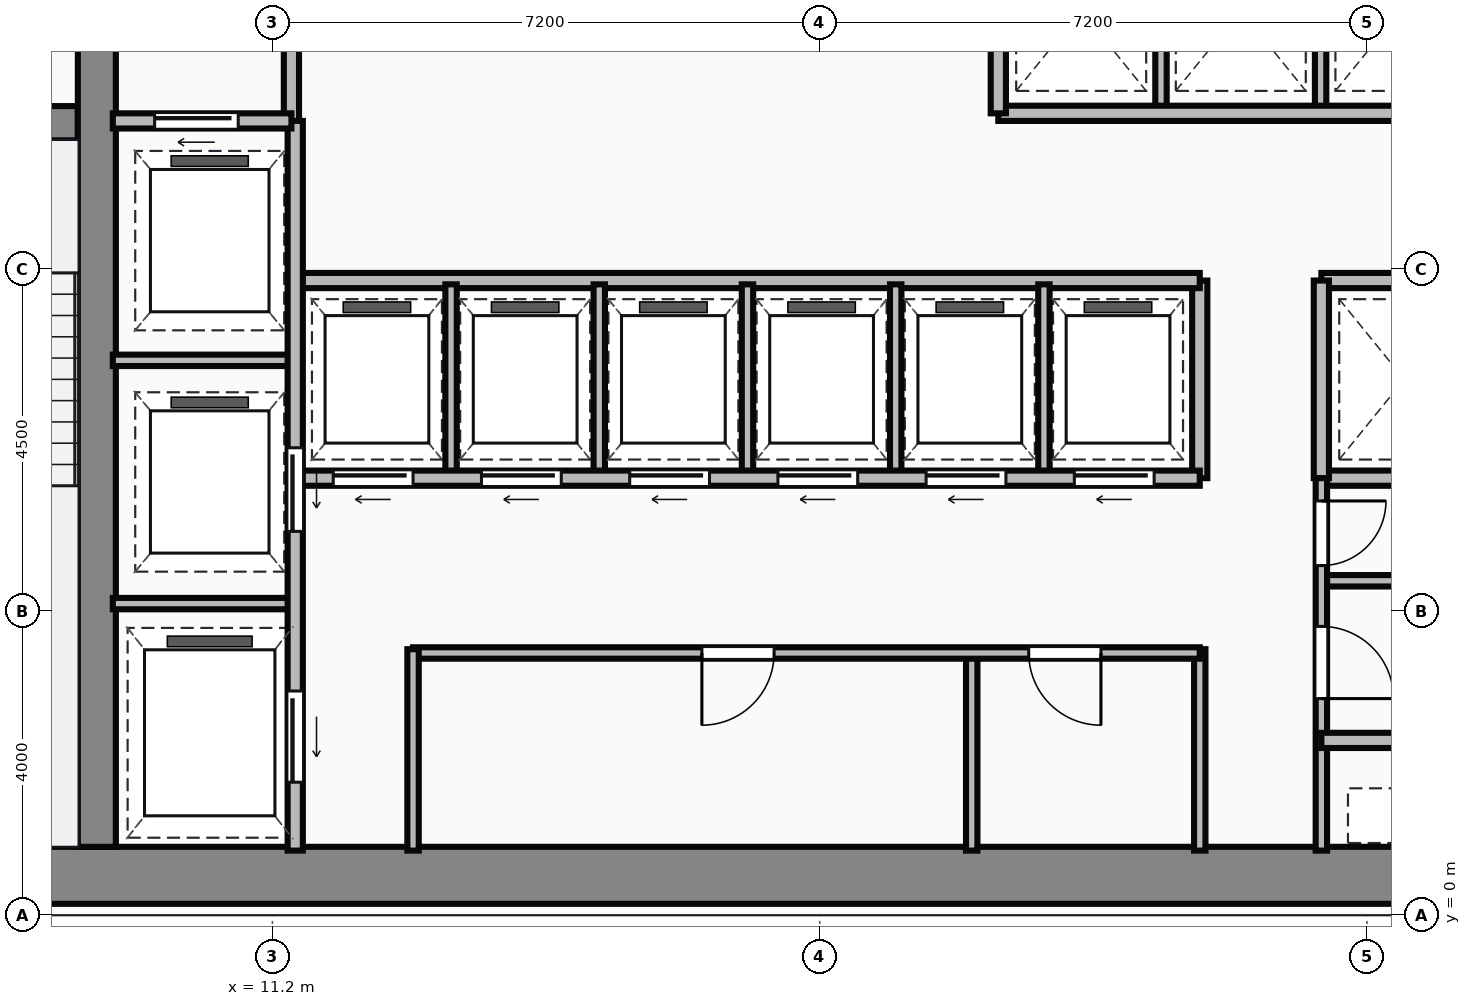
"""IFC4 building model, lengths in metres.
Left out: names, types, materials, properties, quantities, classifications, styles, units other than length and angle.
Written with IfcOpenShell. Run it as: python <this file> out.ifc"""

import sys

from ifc_helpers import new_model, si_unit, direction, frame, frame_2d, origin, place, context, subcontext, project, spatial, rectangle, extrude, source, transform, mapped, element, fill, save


model = new_model("IFC4")
c1 = context("Model", 3, precision=1e-05, world=origin(), true_north=direction((0.0, 1.0)))
c2 = subcontext(c1, "Body", "Model", "MODEL_VIEW")
j1 = project(units=[si_unit("LENGTHUNIT", "METRE"), si_unit("PLANEANGLEUNIT", "RADIAN")], contexts=[c1])
p1 = place(None, origin())
s1 = spatial("IfcSite", under=j1, at=p1, CompositionType="ELEMENT")
p2 = place(p1, origin())
s2 = spatial("IfcBuilding", under=s1, at=p2, CompositionType="ELEMENT")
p3 = place(p2, frame((0.0, 0.0, 155.2)))
s3 = spatial("IfcBuildingStorey", under=s2, at=p3, CompositionType="ELEMENT", Elevation=155.2)
m1 = source(origin(), c2, "Body", "SweptSolid", [
    extrude(rectangle(XDim=29.5, YDim=0.75, at=frame_2d((14.75, 0.0))), origin(), (0.0, 0.0, 1.0), 3.65),
])
p4 = place(p3, frame((4.5, 0.525, 0.0), z_axis=(0.0, 0.0, 1.0), x_axis=(1.0, 0.0, 0.0)))
e1 = element("IfcWall", 1, at=p4, inside=s3, PredefinedType="SHEAR", context=c2, shape_type="MappedRepresentation", body=[
    mapped(m1, transform((0.0, 0.0, 0.0))),
])
m2 = source(origin(), c2, "Body", "SweptSolid", [
    extrude(rectangle(XDim=12.35, YDim=0.5, at=frame_2d((6.175, 0.0))), origin(), (0.0, 0.0, 1.0), 3.65),
])
p5 = place(p3, frame((8.89, 0.9, 0.0), z_axis=(0.0, 0.0, 1.0), x_axis=(0.0, 1.0, 0.0)))
e2 = element("IfcWall", 2, at=p5, inside=s3, PredefinedType="SHEAR", context=c2, shape_type="MappedRepresentation", body=[
    mapped(m2, transform((0.0, 0.0, 0.0))),
])
m3 = source(origin(), c2, "Body", "SweptSolid", [
    extrude(rectangle(XDim=3.39, YDim=0.45, at=frame_2d((1.695, 0.0))), origin(), (0.0, 0.0, 1.0), 3.65),
])
p6 = place(p3, frame((5.25, 10.42, 0.0), z_axis=(0.0, 0.0, 1.0), x_axis=(1.0, 0.0, 0.0)))
e3 = element("IfcWall", 3, at=p6, inside=s3, PredefinedType="SHEAR", context=c2, shape_type="MappedRepresentation", body=[
    mapped(m3, transform((0.0, 0.0, 0.0))),
])
p7 = place(p6, frame((1.05, 0.0, 0.0)))
e4 = element("IfcOpeningElement", 4, at=p7, cuts=e3, PredefinedType="OPENING", context=c2, shape_type="SweptSolid", body=[
    extrude(rectangle(XDim=1.1, YDim=2.15, at=frame_2d((0.55, 1.075))), frame((0.0, 0.235, 0.0), z_axis=(0.0, -1.0, 0.0), x_axis=(1.0, 0.0, 0.0)), (0.0, 0.0, 1.0), 0.47),
])
m4 = source(origin(), c2, "Body", "SweptSolid", [
    extrude(rectangle(XDim=3.18, YDim=0.2, at=frame_2d((1.59, 0.0))), origin(), (0.0, 0.0, 1.0), 3.4),
])
p8 = place(p3, frame((11.45, 10.42, 0.0), z_axis=(0.0, 0.0, 1.0), x_axis=(0.0, 1.0, 0.0)))
e5 = element("IfcWall", 5, at=p8, inside=s3, PredefinedType="PARTITIONING", context=c2, shape_type="MappedRepresentation", body=[
    mapped(m4, transform((0.0, 0.0, 0.0))),
])
m5 = source(origin(), c2, "Body", "SweptSolid", [
    extrude(rectangle(XDim=2.35, YDim=0.2, at=frame_2d((1.175, 0.0))), origin(), (0.0, 0.0, 1.0), 3.4),
])
p9 = place(p3, frame((9.1, 10.45, 0.0), z_axis=(0.0, 0.0, 1.0), x_axis=(1.0, 0.0, 0.0)))
e6 = element("IfcWall", 6, at=p9, inside=s3, PredefinedType="PARTITIONING", context=c2, shape_type="MappedRepresentation", body=[
    mapped(m5, transform((0.0, 0.0, 0.0))),
])
p10 = place(p9, frame((0.55, 0.0, 0.0)))
e7 = element("IfcOpeningElement", 7, at=p10, cuts=e6, PredefinedType="OPENING", context=c2, shape_type="SweptSolid", body=[
    extrude(rectangle(XDim=1.1, YDim=2.15, at=frame_2d((0.55, 1.075))), frame((0.0, 0.11, 0.0), z_axis=(0.0, -1.0, 0.0), x_axis=(1.0, 0.0, 0.0)), (0.0, 0.0, 1.0), 0.22),
])
m6 = source(origin(), c2, "Body", "SweptSolid", [
    extrude(rectangle(XDim=9.6, YDim=0.2, at=frame_2d((4.8, 0.0))), origin(), (0.0, 0.0, 1.0), 3.4),
])
p11 = place(p3, frame((11.5, 0.85, 0.0), z_axis=(0.0, 0.0, 1.0), x_axis=(0.0, 1.0, 0.0)))
e8 = element("IfcWall", 8, at=p11, inside=s3, PredefinedType="PARTITIONING", context=c2, shape_type="MappedRepresentation", body=[
    mapped(m6, transform((0.0, 0.0, 0.0))),
])
p12 = place(p11, frame((4.2, 0.0, 0.0)))
e9 = element("IfcOpeningElement", 9, at=p12, cuts=e8, PredefinedType="OPENING", context=c2, shape_type="SweptSolid", body=[
    extrude(rectangle(XDim=1.1, YDim=2.15, at=frame_2d((0.55, 1.075))), frame((0.0, 0.11, 0.0), z_axis=(0.0, -1.0, 0.0), x_axis=(1.0, 0.0, 0.0)), (0.0, 0.0, 1.0), 0.22),
])
p13 = place(p11, frame((0.9, 0.0, 0.0)))
e10 = element("IfcOpeningElement", 10, at=p13, cuts=e8, PredefinedType="OPENING", context=c2, shape_type="SweptSolid", body=[
    extrude(rectangle(XDim=1.2, YDim=2.15, at=frame_2d((0.6, 1.075))), frame((0.0, 0.11, 0.0), z_axis=(0.0, -1.0, 0.0), x_axis=(1.0, 0.0, 0.0)), (0.0, 0.0, 1.0), 0.22),
])
m7 = source(origin(), c2, "Body", "SweptSolid", [
    extrude(rectangle(XDim=2.4, YDim=0.15, at=frame_2d((1.2, 0.0))), origin(), (0.0, 0.0, 1.0), 3.4),
])
for number, where, z_axis, x_axis in (
    (11, (9.1, 4.1, 0.0), (0.0, 0.0, 1.0), (1.0, 0.0, 0.0)),
    (12, (9.1, 7.3, 0.0), (0.0, 0.0, 1.0), (1.0, 0.0, 0.0)),
):
    element("IfcWall", number, at=place(p3, frame(where, z_axis=z_axis, x_axis=x_axis)), inside=s3, PredefinedType="PARTITIONING", context=c2, shape_type="MappedRepresentation", body=[
        mapped(m7, transform((0.0, 0.0, 0.0))),
    ])
m8 = source(origin(), c2, "Body", "SweptSolid", [
    extrude(rectangle(XDim=2.65, YDim=0.15, at=frame_2d((1.325, 0.0))), origin(), (0.0, 0.0, 1.0), 3.4),
])
p14 = place(p3, frame((13.05, 0.85, 0.0), z_axis=(0.0, 0.0, 1.0), x_axis=(0.0, 1.0, 0.0)))
e13 = element("IfcWall", 13, at=p14, inside=s3, PredefinedType="PARTITIONING", context=c2, shape_type="MappedRepresentation", body=[
    mapped(m8, transform((0.0, 0.0, 0.0))),
])
m9 = source(origin(), c2, "Body", "SweptSolid", [
    extrude(rectangle(XDim=10.35, YDim=0.15, at=frame_2d((5.175, 0.0))), origin(), (0.0, 0.0, 1.0), 3.4),
])
p15 = place(p3, frame((13.05, 3.45, 0.0), z_axis=(0.0, 0.0, 1.0), x_axis=(1.0, 0.0, 0.0)))
e14 = element("IfcWall", 14, at=p15, inside=s3, PredefinedType="PARTITIONING", context=c2, shape_type="MappedRepresentation", body=[
    mapped(m9, transform((0.0, 0.0, 0.0))),
])
p16 = place(p15, frame((3.8, 0.0, 0.0)))
e15 = element("IfcOpeningElement", 15, at=p16, cuts=e14, PredefinedType="OPENING", context=c2, shape_type="SweptSolid", body=[
    extrude(rectangle(XDim=0.95, YDim=2.15, at=frame_2d((0.475, 1.075))), frame((0.0, 0.085, 0.0), z_axis=(0.0, -1.0, 0.0), x_axis=(1.0, 0.0, 0.0)), (0.0, 0.0, 1.0), 0.17),
])
p17 = place(p15, frame((8.1, 0.0, 0.0)))
e16 = element("IfcOpeningElement", 16, at=p17, cuts=e14, PredefinedType="OPENING", context=c2, shape_type="SweptSolid", body=[
    extrude(rectangle(XDim=0.95, YDim=2.15, at=frame_2d((0.475, 1.075))), frame((0.0, 0.085, 0.0), z_axis=(0.0, -1.0, 0.0), x_axis=(1.0, 0.0, 0.0)), (0.0, 0.0, 1.0), 0.17),
])
p18 = place(p3, frame((23.4, 0.85, 0.0), z_axis=(0.0, 0.0, 1.0), x_axis=(0.0, 1.0, 0.0)))
e17 = element("IfcWall", 17, at=p18, inside=s3, PredefinedType="PARTITIONING", context=c2, shape_type="MappedRepresentation", body=[
    mapped(m8, transform((0.0, 0.0, 0.0))),
])
m10 = source(origin(), c2, "Body", "SweptSolid", [
    extrude(rectangle(XDim=2.6, YDim=0.15, at=frame_2d((1.3, 0.0))), origin(), (0.0, 0.0, 1.0), 3.4),
])
p19 = place(p3, frame((20.4, 0.85, 0.0), z_axis=(0.0, 0.0, 1.0), x_axis=(0.0, 1.0, 0.0)))
e18 = element("IfcWall", 18, at=p19, inside=s3, PredefinedType="PARTITIONING", context=c2, shape_type="MappedRepresentation", body=[
    mapped(m10, transform((0.0, 0.0, 0.0))),
])
m11 = source(origin(), c2, "Body", "SweptSolid", [
    extrude(rectangle(XDim=11.85, YDim=0.2, at=frame_2d((5.925, 0.0))), origin(), (0.0, 0.0, 1.0), 3.4),
])
p20 = place(p3, frame((11.55, 5.75, 0.0), z_axis=(0.0, 0.0, 1.0), x_axis=(1.0, 0.0, 0.0)))
e19 = element("IfcWall", 19, at=p20, inside=s3, PredefinedType="PARTITIONING", context=c2, shape_type="MappedRepresentation", body=[
    mapped(m11, transform((0.0, 0.0, 0.0))),
])
p21 = place(p20, frame((0.45, 0.0, 0.0)))
e20 = element("IfcOpeningElement", 20, at=p21, cuts=e19, PredefinedType="OPENING", context=c2, shape_type="SweptSolid", body=[
    extrude(rectangle(XDim=1.05, YDim=2.15, at=frame_2d((0.525, 1.075))), frame((0.0, 0.11, 0.0), z_axis=(0.0, -1.0, 0.0), x_axis=(1.0, 0.0, 0.0)), (0.0, 0.0, 1.0), 0.22),
])
p22 = place(p20, frame((2.4, 0.0, 0.0)))
e21 = element("IfcOpeningElement", 21, at=p22, cuts=e19, PredefinedType="OPENING", context=c2, shape_type="SweptSolid", body=[
    extrude(rectangle(XDim=1.05, YDim=2.15, at=frame_2d((0.525, 1.075))), frame((0.0, 0.11, 0.0), z_axis=(0.0, -1.0, 0.0), x_axis=(1.0, 0.0, 0.0)), (0.0, 0.0, 1.0), 0.22),
])
p23 = place(p20, frame((4.35, 0.0, 0.0)))
e22 = element("IfcOpeningElement", 22, at=p23, cuts=e19, PredefinedType="OPENING", context=c2, shape_type="SweptSolid", body=[
    extrude(rectangle(XDim=1.05, YDim=2.15, at=frame_2d((0.525, 1.075))), frame((0.0, 0.11, 0.0), z_axis=(0.0, -1.0, 0.0), x_axis=(1.0, 0.0, 0.0)), (0.0, 0.0, 1.0), 0.22),
])
p24 = place(p20, frame((6.3, 0.0, 0.0)))
e23 = element("IfcOpeningElement", 23, at=p24, cuts=e19, PredefinedType="OPENING", context=c2, shape_type="SweptSolid", body=[
    extrude(rectangle(XDim=1.05, YDim=2.15, at=frame_2d((0.525, 1.075))), frame((0.0, 0.11, 0.0), z_axis=(0.0, -1.0, 0.0), x_axis=(1.0, 0.0, 0.0)), (0.0, 0.0, 1.0), 0.22),
])
p25 = place(p20, frame((8.25, 0.0, 0.0)))
e24 = element("IfcOpeningElement", 24, at=p25, cuts=e19, PredefinedType="OPENING", context=c2, shape_type="SweptSolid", body=[
    extrude(rectangle(XDim=1.05, YDim=2.15, at=frame_2d((0.525, 1.075))), frame((0.0, 0.11, 0.0), z_axis=(0.0, -1.0, 0.0), x_axis=(1.0, 0.0, 0.0)), (0.0, 0.0, 1.0), 0.22),
])
p26 = place(p20, frame((10.2, 0.0, 0.0)))
e25 = element("IfcOpeningElement", 25, at=p26, cuts=e19, PredefinedType="OPENING", context=c2, shape_type="SweptSolid", body=[
    extrude(rectangle(XDim=1.05, YDim=2.15, at=frame_2d((0.525, 1.075))), frame((0.0, 0.11, 0.0), z_axis=(0.0, -1.0, 0.0), x_axis=(1.0, 0.0, 0.0)), (0.0, 0.0, 1.0), 0.22),
])
p27 = place(p3, frame((11.55, 8.35, 0.0), z_axis=(0.0, 0.0, 1.0), x_axis=(1.0, 0.0, 0.0)))
e26 = element("IfcWall", 26, at=p27, inside=s3, PredefinedType="PARTITIONING", context=c2, shape_type="MappedRepresentation", body=[
    mapped(m11, transform((0.0, 0.0, 0.0))),
])
m12 = source(origin(), c2, "Body", "SweptSolid", [
    extrude(rectangle(XDim=2.6, YDim=0.2, at=frame_2d((1.3, 0.0))), origin(), (0.0, 0.0, 1.0), 3.4),
])
p28 = place(p3, frame((23.4, 5.75, 0.0), z_axis=(0.0, 0.0, 1.0), x_axis=(0.0, 1.0, 0.0)))
e27 = element("IfcWall", 27, at=p28, inside=s3, PredefinedType="PARTITIONING", context=c2, shape_type="MappedRepresentation", body=[
    mapped(m12, transform((0.0, 0.0, 0.0))),
])
m13 = source(origin(), c2, "Body", "SweptSolid", [
    extrude(rectangle(XDim=2.5, YDim=0.15, at=frame_2d((1.25, 0.0))), origin(), (0.0, 0.0, 1.0), 3.4),
])
for number, where, z_axis, x_axis in (
    (28, (13.55, 5.8, 0.0), (0.0, 0.0, 1.0), (0.0, 1.0, 0.0)),
    (29, (15.5, 5.8, 0.0), (0.0, 0.0, 1.0), (0.0, 1.0, 0.0)),
    (30, (17.45, 5.8, 0.0), (0.0, 0.0, 1.0), (0.0, 1.0, 0.0)),
    (31, (19.4, 5.8, 0.0), (0.0, 0.0, 1.0), (0.0, 1.0, 0.0)),
    (32, (21.35, 5.8, 0.0), (0.0, 0.0, 1.0), (0.0, 1.0, 0.0)),
):
    element("IfcWall", number, at=place(p3, frame(where, z_axis=z_axis, x_axis=x_axis)), inside=s3, PredefinedType="PARTITIONING", context=c2, shape_type="MappedRepresentation", body=[
        mapped(m13, transform((0.0, 0.0, 0.0))),
    ])
m14 = source(origin(), c2, "Body", "SweptSolid", [
    extrude(rectangle(XDim=8.8, YDim=0.2, at=frame_2d((4.4, 0.0))), origin(), (0.0, 0.0, 1.0), 3.4),
])
p29 = place(p3, frame((20.75, 10.55, 0.0), z_axis=(0.0, 0.0, 1.0), x_axis=(1.0, 0.0, 0.0)))
e33 = element("IfcWall", 33, at=p29, inside=s3, PredefinedType="PARTITIONING", context=c2, shape_type="MappedRepresentation", body=[
    mapped(m14, transform((0.0, 0.0, 0.0))),
])
m15 = source(origin(), c2, "Body", "SweptSolid", [
    extrude(rectangle(XDim=3.0, YDim=0.2, at=frame_2d((1.5, 0.0))), origin(), (0.0, 0.0, 1.0), 3.4),
])
p30 = place(p3, frame((20.75, 10.55, 0.0), z_axis=(0.0, 0.0, 1.0), x_axis=(0.0, 1.0, 0.0)))
e34 = element("IfcWall", 34, at=p30, inside=s3, PredefinedType="PARTITIONING", context=c2, shape_type="MappedRepresentation", body=[
    mapped(m15, transform((0.0, 0.0, 0.0))),
])
m16 = source(origin(), c2, "Body", "SweptSolid", [
    extrude(rectangle(XDim=2.85, YDim=0.15, at=frame_2d((1.425, 0.0))), origin(), (0.0, 0.0, 1.0), 3.4),
])
for number, where, z_axis, x_axis in (
    (35, (22.89, 10.6, 0.0), (0.0, 0.0, 1.0), (0.0, 1.0, 0.0)),
    (36, (24.99, 10.6, 0.0), (0.0, 0.0, 1.0), (0.0, 1.0, 0.0)),
):
    element("IfcWall", number, at=place(p3, frame(where, z_axis=z_axis, x_axis=x_axis)), inside=s3, PredefinedType="PARTITIONING", context=c2, shape_type="MappedRepresentation", body=[
        mapped(m16, transform((0.0, 0.0, 0.0))),
    ])
m17 = source(origin(), c2, "Body", "SweptSolid", [
    extrude(rectangle(XDim=4.55, YDim=0.2, at=frame_2d((2.275, 0.0))), origin(), (0.0, 0.0, 1.0), 3.4),
])
for number, where, z_axis, x_axis in (
    (37, (25.0, 8.35, 0.0), (0.0, 0.0, 1.0), (1.0, 0.0, 0.0)),
    (38, (25.0, 5.75, 0.0), (0.0, 0.0, 1.0), (1.0, 0.0, 0.0)),
):
    element("IfcWall", number, at=place(p3, frame(where, z_axis=z_axis, x_axis=x_axis)), inside=s3, PredefinedType="PARTITIONING", context=c2, shape_type="MappedRepresentation", body=[
        mapped(m17, transform((0.0, 0.0, 0.0))),
    ])
p31 = place(p3, frame((25.0, 5.75, 0.0), z_axis=(0.0, 0.0, 1.0), x_axis=(0.0, 1.0, 0.0)))
e39 = element("IfcWall", 39, at=p31, inside=s3, PredefinedType="PARTITIONING", context=c2, shape_type="MappedRepresentation", body=[
    mapped(m12, transform((0.0, 0.0, 0.0))),
])
m18 = source(origin(), c2, "Body", "SweptSolid", [
    extrude(rectangle(XDim=4.9, YDim=0.15, at=frame_2d((2.45, 0.0))), origin(), (0.0, 0.0, 1.0), 3.4),
])
p32 = place(p3, frame((25.0, 0.85, 0.0), z_axis=(0.0, 0.0, 1.0), x_axis=(0.0, 1.0, 0.0)))
e40 = element("IfcWall", 40, at=p32, inside=s3, PredefinedType="PARTITIONING", context=c2, shape_type="MappedRepresentation", body=[
    mapped(m18, transform((0.0, 0.0, 0.0))),
])
p33 = place(p32, frame((2.0, 0.0, 0.0)))
e41 = element("IfcOpeningElement", 41, at=p33, cuts=e40, PredefinedType="OPENING", context=c2, shape_type="SweptSolid", body=[
    extrude(rectangle(XDim=0.95, YDim=2.15, at=frame_2d((0.475, 1.075))), frame((0.0, 0.085, 0.0), z_axis=(0.0, -1.0, 0.0), x_axis=(1.0, 0.0, 0.0)), (0.0, 0.0, 1.0), 0.17),
])
p34 = place(p32, frame((3.75, 0.0, 0.0)))
e42 = element("IfcOpeningElement", 42, at=p34, cuts=e40, PredefinedType="OPENING", context=c2, shape_type="SweptSolid", body=[
    extrude(rectangle(XDim=0.85, YDim=2.15, at=frame_2d((0.425, 1.075))), frame((0.0, 0.085, 0.0), z_axis=(0.0, -1.0, 0.0), x_axis=(1.0, 0.0, 0.0)), (0.0, 0.0, 1.0), 0.17),
])
m19 = source(origin(), c2, "Body", "SweptSolid", [
    extrude(rectangle(XDim=2.4, YDim=0.2, at=frame_2d((1.2, 0.0))), origin(), (0.0, 0.0, 1.0), 3.4),
])
p35 = place(p3, frame((25.0, 2.3, 0.0), z_axis=(0.0, 0.0, 1.0), x_axis=(1.0, 0.0, 0.0)))
e43 = element("IfcWall", 43, at=p35, inside=s3, PredefinedType="PARTITIONING", context=c2, shape_type="MappedRepresentation", body=[
    mapped(m19, transform((0.0, 0.0, 0.0))),
])
m20 = source(origin(), c2, "Body", "SweptSolid", [
    extrude(rectangle(XDim=4.55, YDim=0.15, at=frame_2d((2.275, 0.0))), origin(), (0.0, 0.0, 1.0), 3.4),
])
p36 = place(p3, frame((25.0, 4.4, 0.0), z_axis=(0.0, 0.0, 1.0), x_axis=(1.0, 0.0, 0.0)))
e44 = element("IfcWall", 44, at=p36, inside=s3, PredefinedType="PARTITIONING", context=c2, shape_type="MappedRepresentation", body=[
    mapped(m20, transform((0.0, 0.0, 0.0))),
])
m21 = source(origin(), c2, "Body", "SweptSolid", [
    extrude(rectangle(XDim=1.1, YDim=2.15, at=frame_2d((0.55, 1.075))), frame((0.0, 0.025, 0.0), z_axis=(0.0, -1.0, 0.0), x_axis=(1.0, 0.0, 0.0)), (0.0, 0.0, 1.0), 0.05),
])
p37 = place(p10, origin())
e45 = element("IfcDoor", 45, at=p37, inside=s3, OperationType="SLIDING_TO_LEFT", PredefinedType="DOOR", context=c2, shape_type="MappedRepresentation", body=[
    mapped(m21, transform((0.0, 0.0, 0.0))),
])
fill(e7, e45)
p38 = place(p12, frame((1.1, 0.0, 0.0), z_axis=(0.0, 0.0, 1.0), x_axis=(-1.0, 0.0, 0.0)))
e46 = element("IfcDoor", 46, at=p38, inside=s3, OperationType="SLIDING_TO_LEFT", PredefinedType="DOOR", context=c2, shape_type="MappedRepresentation", body=[
    mapped(m21, transform((0.0, 0.0, 0.0))),
])
fill(e9, e46)
m22 = source(origin(), c2, "Body", "SweptSolid", [
    extrude(rectangle(XDim=1.2, YDim=2.15, at=frame_2d((0.6, 1.075))), frame((0.0, 0.025, 0.0), z_axis=(0.0, -1.0, 0.0), x_axis=(1.0, 0.0, 0.0)), (0.0, 0.0, 1.0), 0.05),
])
p39 = place(p13, frame((1.2, 0.0, 0.0), z_axis=(0.0, 0.0, 1.0), x_axis=(-1.0, 0.0, 0.0)))
e47 = element("IfcDoor", 47, at=p39, inside=s3, OperationType="SLIDING_TO_LEFT", PredefinedType="DOOR", context=c2, shape_type="MappedRepresentation", body=[
    mapped(m22, transform((0.0, 0.0, 0.0))),
])
fill(e10, e47)
m23 = source(origin(), c2, "Body", "SweptSolid", [
    extrude(rectangle(XDim=0.95, YDim=2.15, at=frame_2d((0.475, 1.075))), frame((0.0, 0.025, 0.0), z_axis=(0.0, -1.0, 0.0), x_axis=(1.0, 0.0, 0.0)), (0.0, 0.0, 1.0), 0.05),
])
p40 = place(p16, origin())
e48 = element("IfcDoor", 48, at=p40, inside=s3, OperationType="SINGLE_SWING_LEFT", PredefinedType="DOOR", context=c2, shape_type="MappedRepresentation", body=[
    mapped(m23, transform((0.0, 0.0, 0.0))),
])
fill(e15, e48)
p41 = place(p17, origin())
e49 = element("IfcDoor", 49, at=p41, inside=s3, OperationType="SINGLE_SWING_RIGHT", PredefinedType="DOOR", context=c2, shape_type="MappedRepresentation", body=[
    mapped(m23, transform((0.0, 0.0, 0.0))),
])
fill(e16, e49)
m24 = source(origin(), c2, "Body", "SweptSolid", [
    extrude(rectangle(XDim=1.05, YDim=2.15, at=frame_2d((0.525, 1.075))), frame((0.0, 0.025, 0.0), z_axis=(0.0, -1.0, 0.0), x_axis=(1.0, 0.0, 0.0)), (0.0, 0.0, 1.0), 0.05),
])
p42 = place(p21, frame((1.05, 0.0, 0.0), z_axis=(0.0, 0.0, 1.0), x_axis=(-1.0, 0.0, 0.0)))
e50 = element("IfcDoor", 50, at=p42, inside=s3, OperationType="SLIDING_TO_LEFT", PredefinedType="DOOR", context=c2, shape_type="MappedRepresentation", body=[
    mapped(m24, transform((0.0, 0.0, 0.0))),
])
fill(e20, e50)
p43 = place(p22, frame((1.05, 0.0, 0.0), z_axis=(0.0, 0.0, 1.0), x_axis=(-1.0, 0.0, 0.0)))
e51 = element("IfcDoor", 51, at=p43, inside=s3, OperationType="SLIDING_TO_LEFT", PredefinedType="DOOR", context=c2, shape_type="MappedRepresentation", body=[
    mapped(m24, transform((0.0, 0.0, 0.0))),
])
fill(e21, e51)
p44 = place(p23, frame((1.05, 0.0, 0.0), z_axis=(0.0, 0.0, 1.0), x_axis=(-1.0, 0.0, 0.0)))
e52 = element("IfcDoor", 52, at=p44, inside=s3, OperationType="SLIDING_TO_LEFT", PredefinedType="DOOR", context=c2, shape_type="MappedRepresentation", body=[
    mapped(m24, transform((0.0, 0.0, 0.0))),
])
fill(e22, e52)
p45 = place(p24, frame((1.05, 0.0, 0.0), z_axis=(0.0, 0.0, 1.0), x_axis=(-1.0, 0.0, 0.0)))
e53 = element("IfcDoor", 53, at=p45, inside=s3, OperationType="SLIDING_TO_LEFT", PredefinedType="DOOR", context=c2, shape_type="MappedRepresentation", body=[
    mapped(m24, transform((0.0, 0.0, 0.0))),
])
fill(e23, e53)
p46 = place(p25, frame((1.05, 0.0, 0.0), z_axis=(0.0, 0.0, 1.0), x_axis=(-1.0, 0.0, 0.0)))
e54 = element("IfcDoor", 54, at=p46, inside=s3, OperationType="SLIDING_TO_LEFT", PredefinedType="DOOR", context=c2, shape_type="MappedRepresentation", body=[
    mapped(m24, transform((0.0, 0.0, 0.0))),
])
fill(e24, e54)
p47 = place(p26, frame((1.05, 0.0, 0.0), z_axis=(0.0, 0.0, 1.0), x_axis=(-1.0, 0.0, 0.0)))
e55 = element("IfcDoor", 55, at=p47, inside=s3, OperationType="SLIDING_TO_LEFT", PredefinedType="DOOR", context=c2, shape_type="MappedRepresentation", body=[
    mapped(m24, transform((0.0, 0.0, 0.0))),
])
fill(e25, e55)
p48 = place(p33, origin())
e56 = element("IfcDoor", 56, at=p48, inside=s3, OperationType="SINGLE_SWING_LEFT", PredefinedType="DOOR", context=c2, shape_type="MappedRepresentation", body=[
    mapped(m23, transform((0.0, 0.0, 0.0))),
])
fill(e41, e56)
m25 = source(origin(), c2, "Body", "SweptSolid", [
    extrude(rectangle(XDim=0.85, YDim=2.15, at=frame_2d((0.425, 1.075))), frame((0.0, 0.025, 0.0), z_axis=(0.0, -1.0, 0.0), x_axis=(1.0, 0.0, 0.0)), (0.0, 0.0, 1.0), 0.05),
])
p49 = place(p34, origin())
e57 = element("IfcDoor", 57, at=p49, inside=s3, OperationType="SINGLE_SWING_RIGHT", PredefinedType="DOOR", context=c2, shape_type="MappedRepresentation", body=[
    mapped(m25, transform((0.0, 0.0, 0.0))),
])
fill(e42, e57)
save(model, sys.argv[1])
